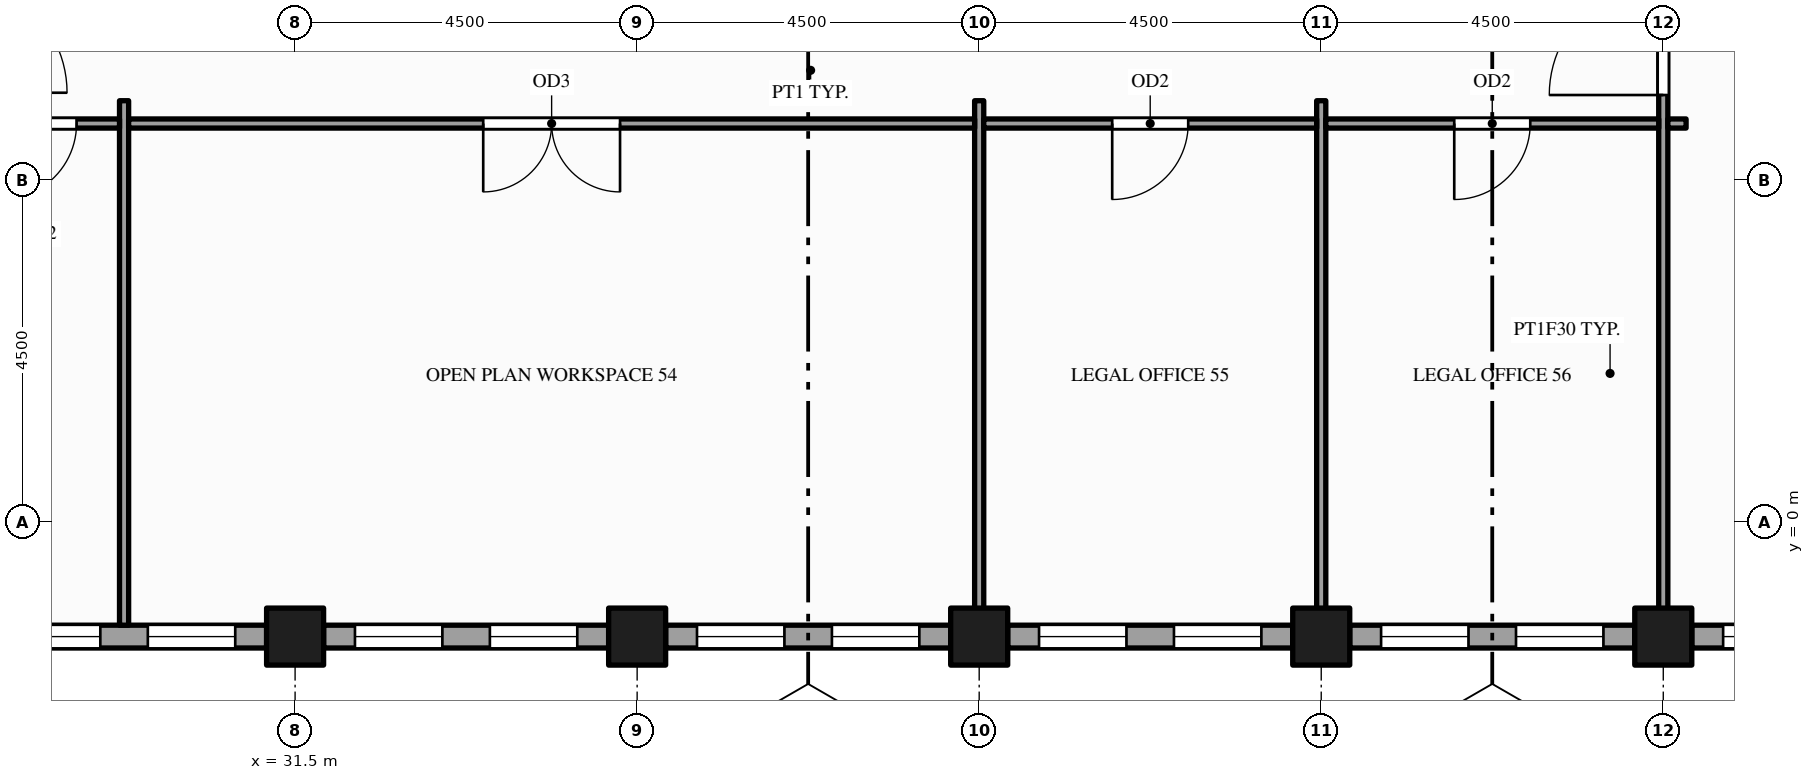
"""IFC4 building model, lengths in metres.
Left out: names, types, materials, properties, quantities, classifications, styles, units other than length and angle.
Written with IfcOpenShell. Run it as: python <this file> out.ifc"""

import sys

from ifc_helpers import new_model, si_unit, direction, frame, frame_2d, origin, origin_2d, place, context, subcontext, project, spatial, rectangle, hollow_rectangle, extrude, element, fill, save


model = new_model("IFC4")
c1 = context("Model", 3, precision=1e-05, world=origin(), true_north=direction((0.0, 1.0)))
c2 = subcontext(c1, "Body", "Model", "MODEL_VIEW")
j1 = project(units=[si_unit("LENGTHUNIT", "METRE"), si_unit("PLANEANGLEUNIT", "RADIAN")], contexts=[c1])
p1 = place(None, origin())
s1 = spatial("IfcSite", under=j1, at=p1, CompositionType="ELEMENT")
p2 = place(p1, origin())
s2 = spatial("IfcBuilding", under=s1, at=p2, CompositionType="ELEMENT")
p3 = place(p2, frame((0.0, 0.0, 239.0)))
s3 = spatial("IfcBuildingStorey", under=s2, at=p3, CompositionType="ELEMENT", Elevation=239.0)
for number, where, z_axis, x_axis in (
    (1, (31.5, -1.5, -0.15), (0.0, 0.0, 1.0), (1.0, 0.0, 0.0)),
    (2, (36.0, -1.5, -0.15), (0.0, 0.0, 1.0), (1.0, 0.0, 0.0)),
    (3, (40.5, -1.5, -0.15), (0.0, 0.0, 1.0), (1.0, 0.0, 0.0)),
    (4, (45.0, -1.5, -0.15), (0.0, 0.0, 1.0), (1.0, 0.0, 0.0)),
    (5, (49.5, -1.5, -0.15), (0.0, 0.0, 1.0), (1.0, 0.0, 0.0)),
):
    element("IfcColumn", number, at=place(p3, frame(where, z_axis=z_axis, x_axis=x_axis)), inside=s3, PredefinedType="COLUMN", context=c2, shape_type="SweptSolid", body=[
        extrude(hollow_rectangle(XDim=0.75, YDim=0.75, WallThickness=0.036, at=origin_2d()), origin(), (0.0, 0.0, 1.0), 3.85),
    ])
p4 = place(p3, frame((27.375, -1.5, 0.0), z_axis=(0.0, 0.0, 1.0), x_axis=(1.0, 0.0, 0.0)))
e6 = element("IfcWall", 6, at=p4, inside=s3, PredefinedType="STANDARD", context=c2, shape_type="SweptSolid", body=[
    extrude(rectangle(XDim=3.75, YDim=0.3, at=frame_2d((1.875, 0.0))), origin(), (0.0, 0.0, 1.0), 2.72),
])
p5 = place(p4, frame((0.413, 0.0, 0.9)))
e7 = element("IfcOpeningElement", 7, at=p5, cuts=e6, PredefinedType="OPENING", context=c2, shape_type="SweptSolid", body=[
    extrude(rectangle(XDim=1.15, YDim=1.5, at=frame_2d((0.575, 0.75))), frame((0.0, 0.16, 0.0), z_axis=(0.0, -1.0, 0.0), x_axis=(1.0, 0.0, 0.0)), (0.0, 0.0, 1.0), 0.32),
])
p6 = place(p4, frame((2.188, 0.0, 0.9)))
e8 = element("IfcOpeningElement", 8, at=p6, cuts=e6, PredefinedType="OPENING", context=c2, shape_type="SweptSolid", body=[
    extrude(rectangle(XDim=1.15, YDim=1.5, at=frame_2d((0.575, 0.75))), frame((0.0, 0.16, 0.0), z_axis=(0.0, -1.0, 0.0), x_axis=(1.0, 0.0, 0.0)), (0.0, 0.0, 1.0), 0.32),
])
p7 = place(p3, frame((31.875, -1.5, 0.0), z_axis=(0.0, 0.0, 1.0), x_axis=(1.0, 0.0, 0.0)))
e9 = element("IfcWall", 9, at=p7, inside=s3, PredefinedType="STANDARD", context=c2, shape_type="SweptSolid", body=[
    extrude(rectangle(XDim=3.75, YDim=0.3, at=frame_2d((1.875, 0.0))), origin(), (0.0, 0.0, 1.0), 2.72),
])
p8 = place(p7, frame((0.413, 0.0, 0.9)))
e10 = element("IfcOpeningElement", 10, at=p8, cuts=e9, PredefinedType="OPENING", context=c2, shape_type="SweptSolid", body=[
    extrude(rectangle(XDim=1.15, YDim=1.5, at=frame_2d((0.575, 0.75))), frame((0.0, 0.16, 0.0), z_axis=(0.0, -1.0, 0.0), x_axis=(1.0, 0.0, 0.0)), (0.0, 0.0, 1.0), 0.32),
])
p9 = place(p7, frame((2.188, 0.0, 0.9)))
e11 = element("IfcOpeningElement", 11, at=p9, cuts=e9, PredefinedType="OPENING", context=c2, shape_type="SweptSolid", body=[
    extrude(rectangle(XDim=1.15, YDim=1.5, at=frame_2d((0.575, 0.75))), frame((0.0, 0.16, 0.0), z_axis=(0.0, -1.0, 0.0), x_axis=(1.0, 0.0, 0.0)), (0.0, 0.0, 1.0), 0.32),
])
p10 = place(p3, frame((36.375, -1.5, 0.0), z_axis=(0.0, 0.0, 1.0), x_axis=(1.0, 0.0, 0.0)))
e12 = element("IfcWall", 12, at=p10, inside=s3, PredefinedType="STANDARD", context=c2, shape_type="SweptSolid", body=[
    extrude(rectangle(XDim=3.75, YDim=0.3, at=frame_2d((1.875, 0.0))), origin(), (0.0, 0.0, 1.0), 2.72),
])
p11 = place(p10, frame((0.413, 0.0, 0.9)))
e13 = element("IfcOpeningElement", 13, at=p11, cuts=e12, PredefinedType="OPENING", context=c2, shape_type="SweptSolid", body=[
    extrude(rectangle(XDim=1.15, YDim=1.5, at=frame_2d((0.575, 0.75))), frame((0.0, 0.16, 0.0), z_axis=(0.0, -1.0, 0.0), x_axis=(1.0, 0.0, 0.0)), (0.0, 0.0, 1.0), 0.32),
])
p12 = place(p10, frame((2.188, 0.0, 0.9)))
e14 = element("IfcOpeningElement", 14, at=p12, cuts=e12, PredefinedType="OPENING", context=c2, shape_type="SweptSolid", body=[
    extrude(rectangle(XDim=1.15, YDim=1.5, at=frame_2d((0.575, 0.75))), frame((0.0, 0.16, 0.0), z_axis=(0.0, -1.0, 0.0), x_axis=(1.0, 0.0, 0.0)), (0.0, 0.0, 1.0), 0.32),
])
p13 = place(p3, frame((40.875, -1.5, 0.0), z_axis=(0.0, 0.0, 1.0), x_axis=(1.0, 0.0, 0.0)))
e15 = element("IfcWall", 15, at=p13, inside=s3, PredefinedType="STANDARD", context=c2, shape_type="SweptSolid", body=[
    extrude(rectangle(XDim=3.75, YDim=0.3, at=frame_2d((1.875, 0.0))), origin(), (0.0, 0.0, 1.0), 2.72),
])
p14 = place(p13, frame((0.413, 0.0, 0.9)))
e16 = element("IfcOpeningElement", 16, at=p14, cuts=e15, PredefinedType="OPENING", context=c2, shape_type="SweptSolid", body=[
    extrude(rectangle(XDim=1.15, YDim=1.5, at=frame_2d((0.575, 0.75))), frame((0.0, 0.16, 0.0), z_axis=(0.0, -1.0, 0.0), x_axis=(1.0, 0.0, 0.0)), (0.0, 0.0, 1.0), 0.32),
])
p15 = place(p13, frame((2.188, 0.0, 0.9)))
e17 = element("IfcOpeningElement", 17, at=p15, cuts=e15, PredefinedType="OPENING", context=c2, shape_type="SweptSolid", body=[
    extrude(rectangle(XDim=1.15, YDim=1.5, at=frame_2d((0.575, 0.75))), frame((0.0, 0.16, 0.0), z_axis=(0.0, -1.0, 0.0), x_axis=(1.0, 0.0, 0.0)), (0.0, 0.0, 1.0), 0.32),
])
p16 = place(p3, frame((45.375, -1.5, 0.0), z_axis=(0.0, 0.0, 1.0), x_axis=(1.0, 0.0, 0.0)))
e18 = element("IfcWall", 18, at=p16, inside=s3, PredefinedType="STANDARD", context=c2, shape_type="SweptSolid", body=[
    extrude(rectangle(XDim=3.75, YDim=0.3, at=frame_2d((1.875, 0.0))), origin(), (0.0, 0.0, 1.0), 2.72),
])
p17 = place(p16, frame((0.413, 0.0, 0.9)))
e19 = element("IfcOpeningElement", 19, at=p17, cuts=e18, PredefinedType="OPENING", context=c2, shape_type="SweptSolid", body=[
    extrude(rectangle(XDim=1.15, YDim=1.5, at=frame_2d((0.575, 0.75))), frame((0.0, 0.16, 0.0), z_axis=(0.0, -1.0, 0.0), x_axis=(1.0, 0.0, 0.0)), (0.0, 0.0, 1.0), 0.32),
])
p18 = place(p16, frame((2.188, 0.0, 0.9)))
e20 = element("IfcOpeningElement", 20, at=p18, cuts=e18, PredefinedType="OPENING", context=c2, shape_type="SweptSolid", body=[
    extrude(rectangle(XDim=1.15, YDim=1.5, at=frame_2d((0.575, 0.75))), frame((0.0, 0.16, 0.0), z_axis=(0.0, -1.0, 0.0), x_axis=(1.0, 0.0, 0.0)), (0.0, 0.0, 1.0), 0.32),
])
p19 = place(p3, frame((49.875, -1.5, 0.0), z_axis=(0.0, 0.0, 1.0), x_axis=(1.0, 0.0, 0.0)))
e21 = element("IfcWall", 21, at=p19, inside=s3, PredefinedType="STANDARD", context=c2, shape_type="SweptSolid", body=[
    extrude(rectangle(XDim=3.75, YDim=0.3, at=frame_2d((1.875, 0.0))), origin(), (0.0, 0.0, 1.0), 2.72),
])
p20 = place(p19, frame((0.413, 0.0, 0.9)))
e22 = element("IfcOpeningElement", 22, at=p20, cuts=e21, PredefinedType="OPENING", context=c2, shape_type="SweptSolid", body=[
    extrude(rectangle(XDim=1.15, YDim=1.5, at=frame_2d((0.575, 0.75))), frame((0.0, 0.16, 0.0), z_axis=(0.0, -1.0, 0.0), x_axis=(1.0, 0.0, 0.0)), (0.0, 0.0, 1.0), 0.32),
])
p21 = place(p19, frame((2.188, 0.0, 0.9)))
e23 = element("IfcOpeningElement", 23, at=p21, cuts=e21, PredefinedType="OPENING", context=c2, shape_type="SweptSolid", body=[
    extrude(rectangle(XDim=1.15, YDim=1.5, at=frame_2d((0.575, 0.75))), frame((0.0, 0.16, 0.0), z_axis=(0.0, -1.0, 0.0), x_axis=(1.0, 0.0, 0.0)), (0.0, 0.0, 1.0), 0.32),
])
p22 = place(p3, frame((29.25, -1.35, 0.0), z_axis=(0.0, 0.0, 1.0), x_axis=(0.0, 1.0, 0.0)))
e24 = element("IfcWall", 24, at=p22, inside=s3, PredefinedType="PARTITIONING", context=c2, shape_type="SweptSolid", body=[
    extrude(rectangle(XDim=6.9, YDim=0.12, at=frame_2d((3.45, 0.0))), origin(), (0.0, 0.0, 1.0), 2.72),
])
for number, where, z_axis, x_axis in (
    (25, (40.5, -1.35, 0.0), (0.0, 0.0, 1.0), (0.0, 1.0, 0.0)),
    (26, (45.0, -1.35, 0.0), (0.0, 0.0, 1.0), (0.0, 1.0, 0.0)),
):
    element("IfcWall", number, at=place(p3, frame(where, z_axis=z_axis, x_axis=x_axis)), inside=s3, PredefinedType="PARTITIONING", context=c2, shape_type="SweptSolid", body=[
        extrude(rectangle(XDim=6.9, YDim=0.12, at=frame_2d((3.45, 0.0))), origin(), (0.0, 0.0, 1.0), 2.3),
    ])
p23 = place(p3, frame((49.5, -1.35, 0.0), z_axis=(0.0, 0.0, 1.0), x_axis=(0.0, 1.0, 0.0)))
e27 = element("IfcWall", 27, at=p23, inside=s3, PredefinedType="PARTITIONING", context=c2, shape_type="SweptSolid", body=[
    extrude(rectangle(XDim=22.2, YDim=0.12, at=frame_2d((11.1, 0.0))), origin(), (0.0, 0.0, 1.0), 2.3),
])
p24 = place(p23, frame((6.975, 0.0, 0.0)))
e28 = element("IfcOpeningElement", 28, at=p24, cuts=e27, PredefinedType="OPENING", context=c2, shape_type="SweptSolid", body=[
    extrude(rectangle(XDim=1.5, YDim=2.1, at=frame_2d((0.75, 1.05))), frame((0.0, 0.07, 0.0), z_axis=(0.0, -1.0, 0.0), x_axis=(1.0, 0.0, 0.0)), (0.0, 0.0, 1.0), 0.14),
])
p25 = place(p23, frame((13.725, 0.0, 0.0)))
e29 = element("IfcOpeningElement", 29, at=p25, cuts=e27, PredefinedType="OPENING", context=c2, shape_type="SweptSolid", body=[
    extrude(rectangle(XDim=1.5, YDim=2.1, at=frame_2d((0.75, 1.05))), frame((0.0, 0.07, 0.0), z_axis=(0.0, -1.0, 0.0), x_axis=(1.0, 0.0, 0.0)), (0.0, 0.0, 1.0), 0.14),
])
p26 = place(p23, frame((9.29, 0.0, 0.0)))
e30 = element("IfcOpeningElement", 30, at=p26, cuts=e27, PredefinedType="OPENING", context=c2, shape_type="SweptSolid", body=[
    extrude(rectangle(XDim=0.9, YDim=2.1, at=frame_2d((0.45, 1.05))), frame((0.0, 0.07, 0.0), z_axis=(0.0, -1.0, 0.0), x_axis=(1.0, 0.0, 0.0)), (0.0, 0.0, 1.0), 0.14),
])
p27 = place(p23, frame((10.65, 0.0, 0.0)))
e31 = element("IfcOpeningElement", 31, at=p27, cuts=e27, PredefinedType="OPENING", context=c2, shape_type="SweptSolid", body=[
    extrude(rectangle(XDim=0.9, YDim=2.1, at=frame_2d((0.45, 1.05))), frame((0.0, 0.07, 0.0), z_axis=(0.0, -1.0, 0.0), x_axis=(1.0, 0.0, 0.0)), (0.0, 0.0, 1.0), 0.14),
])
p28 = place(p23, frame((12.01, 0.0, 0.0)))
e32 = element("IfcOpeningElement", 32, at=p28, cuts=e27, PredefinedType="OPENING", context=c2, shape_type="SweptSolid", body=[
    extrude(rectangle(XDim=1.0, YDim=2.1, at=frame_2d((0.5, 1.05))), frame((0.0, 0.07, 0.0), z_axis=(0.0, -1.0, 0.0), x_axis=(1.0, 0.0, 0.0)), (0.0, 0.0, 1.0), 0.14),
])
p29 = place(p3, frame((27.06, 5.25, 0.0), z_axis=(0.0, 0.0, 1.0), x_axis=(1.0, 0.0, 0.0)))
e33 = element("IfcWall", 33, at=p29, inside=s3, PredefinedType="PARTITIONING", context=c2, shape_type="SweptSolid", body=[
    extrude(rectangle(XDim=2.13, YDim=0.12, at=frame_2d((1.065, 0.0))), origin(), (0.0, 0.0, 1.0), 2.77),
])
p30 = place(p29, frame((0.565, 0.0, 0.0)))
e34 = element("IfcOpeningElement", 34, at=p30, cuts=e33, PredefinedType="OPENING", context=c2, shape_type="SweptSolid", body=[
    extrude(rectangle(XDim=1.0, YDim=2.1, at=frame_2d((0.5, 1.05))), frame((0.0, 0.07, 0.0), z_axis=(0.0, -1.0, 0.0), x_axis=(1.0, 0.0, 0.0)), (0.0, 0.0, 1.0), 0.14),
])
p31 = place(p3, frame((29.31, 5.25, 0.0), z_axis=(0.0, 0.0, 1.0), x_axis=(1.0, 0.0, 0.0)))
e35 = element("IfcWall", 35, at=p31, inside=s3, PredefinedType="PARTITIONING", context=c2, shape_type="SweptSolid", body=[
    extrude(rectangle(XDim=11.13, YDim=0.12, at=frame_2d((5.565, 0.0))), origin(), (0.0, 0.0, 1.0), 2.77),
])
p32 = place(p31, frame((4.665, 0.0, 0.0)))
e36 = element("IfcOpeningElement", 36, at=p32, cuts=e35, PredefinedType="OPENING", context=c2, shape_type="SweptSolid", body=[
    extrude(rectangle(XDim=1.8, YDim=2.1, at=frame_2d((0.9, 1.05))), frame((0.0, 0.07, 0.0), z_axis=(0.0, -1.0, 0.0), x_axis=(1.0, 0.0, 0.0)), (0.0, 0.0, 1.0), 0.14),
])
p33 = place(p3, frame((40.56, 5.25, 0.0), z_axis=(0.0, 0.0, 1.0), x_axis=(1.0, 0.0, 0.0)))
e37 = element("IfcWall", 37, at=p33, inside=s3, PredefinedType="PARTITIONING", context=c2, shape_type="SweptSolid", body=[
    extrude(rectangle(XDim=4.38, YDim=0.12, at=frame_2d((2.19, 0.0))), origin(), (0.0, 0.0, 1.0), 2.77),
])
p34 = place(p33, frame((1.69, 0.0, 0.0)))
e38 = element("IfcOpeningElement", 38, at=p34, cuts=e37, PredefinedType="OPENING", context=c2, shape_type="SweptSolid", body=[
    extrude(rectangle(XDim=1.0, YDim=2.1, at=frame_2d((0.5, 1.05))), frame((0.0, 0.07, 0.0), z_axis=(0.0, -1.0, 0.0), x_axis=(1.0, 0.0, 0.0)), (0.0, 0.0, 1.0), 0.14),
])
p35 = place(p3, frame((45.06, 5.25, 0.0), z_axis=(0.0, 0.0, 1.0), x_axis=(1.0, 0.0, 0.0)))
e39 = element("IfcWall", 39, at=p35, inside=s3, PredefinedType="PARTITIONING", context=c2, shape_type="SweptSolid", body=[
    extrude(rectangle(XDim=4.38, YDim=0.12, at=frame_2d((2.19, 0.0))), origin(), (0.0, 0.0, 1.0), 2.77),
])
p36 = place(p35, frame((1.69, 0.0, 0.0)))
e40 = element("IfcOpeningElement", 40, at=p36, cuts=e39, PredefinedType="OPENING", context=c2, shape_type="SweptSolid", body=[
    extrude(rectangle(XDim=1.0, YDim=2.1, at=frame_2d((0.5, 1.05))), frame((0.0, 0.07, 0.0), z_axis=(0.0, -1.0, 0.0), x_axis=(1.0, 0.0, 0.0)), (0.0, 0.0, 1.0), 0.14),
])
p37 = place(p3, frame((49.56, 5.25, 0.0), z_axis=(0.0, 0.0, 1.0), x_axis=(1.0, 0.0, 0.0)))
e41 = element("IfcWall", 41, at=p37, inside=s3, PredefinedType="PARTITIONING", context=c2, shape_type="SweptSolid", body=[
    extrude(rectangle(XDim=0.24, YDim=0.12, at=frame_2d((0.12, 0.0))), origin(), (0.0, 0.0, 1.0), 2.77),
])
p38 = place(p5, origin())
e42 = element("IfcWindow", 42, at=p38, inside=s3, PartitioningType="SINGLE_PANEL", PredefinedType="WINDOW", context=c2, shape_type="SweptSolid", body=[
    extrude(rectangle(XDim=1.15, YDim=1.5, at=frame_2d((0.575, 0.75))), frame((0.0, 0.03, 0.0), z_axis=(0.0, -1.0, 0.0), x_axis=(1.0, 0.0, 0.0)), (0.0, 0.0, 1.0), 0.06),
])
fill(e7, e42)
p39 = place(p6, origin())
e43 = element("IfcWindow", 43, at=p39, inside=s3, PartitioningType="SINGLE_PANEL", PredefinedType="WINDOW", context=c2, shape_type="SweptSolid", body=[
    extrude(rectangle(XDim=1.15, YDim=1.5, at=frame_2d((0.575, 0.75))), frame((0.0, 0.03, 0.0), z_axis=(0.0, -1.0, 0.0), x_axis=(1.0, 0.0, 0.0)), (0.0, 0.0, 1.0), 0.06),
])
fill(e8, e43)
p40 = place(p8, origin())
e44 = element("IfcWindow", 44, at=p40, inside=s3, PartitioningType="SINGLE_PANEL", PredefinedType="WINDOW", context=c2, shape_type="SweptSolid", body=[
    extrude(rectangle(XDim=1.15, YDim=1.5, at=frame_2d((0.575, 0.75))), frame((0.0, 0.03, 0.0), z_axis=(0.0, -1.0, 0.0), x_axis=(1.0, 0.0, 0.0)), (0.0, 0.0, 1.0), 0.06),
])
fill(e10, e44)
p41 = place(p9, origin())
e45 = element("IfcWindow", 45, at=p41, inside=s3, PartitioningType="SINGLE_PANEL", PredefinedType="WINDOW", context=c2, shape_type="SweptSolid", body=[
    extrude(rectangle(XDim=1.15, YDim=1.5, at=frame_2d((0.575, 0.75))), frame((0.0, 0.03, 0.0), z_axis=(0.0, -1.0, 0.0), x_axis=(1.0, 0.0, 0.0)), (0.0, 0.0, 1.0), 0.06),
])
fill(e11, e45)
p42 = place(p11, origin())
e46 = element("IfcWindow", 46, at=p42, inside=s3, PartitioningType="SINGLE_PANEL", PredefinedType="WINDOW", context=c2, shape_type="SweptSolid", body=[
    extrude(rectangle(XDim=1.15, YDim=1.5, at=frame_2d((0.575, 0.75))), frame((0.0, 0.03, 0.0), z_axis=(0.0, -1.0, 0.0), x_axis=(1.0, 0.0, 0.0)), (0.0, 0.0, 1.0), 0.06),
])
fill(e13, e46)
p43 = place(p12, origin())
e47 = element("IfcWindow", 47, at=p43, inside=s3, PartitioningType="SINGLE_PANEL", PredefinedType="WINDOW", context=c2, shape_type="SweptSolid", body=[
    extrude(rectangle(XDim=1.15, YDim=1.5, at=frame_2d((0.575, 0.75))), frame((0.0, 0.03, 0.0), z_axis=(0.0, -1.0, 0.0), x_axis=(1.0, 0.0, 0.0)), (0.0, 0.0, 1.0), 0.06),
])
fill(e14, e47)
p44 = place(p14, origin())
e48 = element("IfcWindow", 48, at=p44, inside=s3, PartitioningType="SINGLE_PANEL", PredefinedType="WINDOW", context=c2, shape_type="SweptSolid", body=[
    extrude(rectangle(XDim=1.15, YDim=1.5, at=frame_2d((0.575, 0.75))), frame((0.0, 0.03, 0.0), z_axis=(0.0, -1.0, 0.0), x_axis=(1.0, 0.0, 0.0)), (0.0, 0.0, 1.0), 0.06),
])
fill(e16, e48)
p45 = place(p15, origin())
e49 = element("IfcWindow", 49, at=p45, inside=s3, PartitioningType="SINGLE_PANEL", PredefinedType="WINDOW", context=c2, shape_type="SweptSolid", body=[
    extrude(rectangle(XDim=1.15, YDim=1.5, at=frame_2d((0.575, 0.75))), frame((0.0, 0.03, 0.0), z_axis=(0.0, -1.0, 0.0), x_axis=(1.0, 0.0, 0.0)), (0.0, 0.0, 1.0), 0.06),
])
fill(e17, e49)
p46 = place(p17, origin())
e50 = element("IfcWindow", 50, at=p46, inside=s3, PartitioningType="SINGLE_PANEL", PredefinedType="WINDOW", context=c2, shape_type="SweptSolid", body=[
    extrude(rectangle(XDim=1.15, YDim=1.5, at=frame_2d((0.575, 0.75))), frame((0.0, 0.03, 0.0), z_axis=(0.0, -1.0, 0.0), x_axis=(1.0, 0.0, 0.0)), (0.0, 0.0, 1.0), 0.06),
])
fill(e19, e50)
p47 = place(p18, origin())
e51 = element("IfcWindow", 51, at=p47, inside=s3, PartitioningType="SINGLE_PANEL", PredefinedType="WINDOW", context=c2, shape_type="SweptSolid", body=[
    extrude(rectangle(XDim=1.15, YDim=1.5, at=frame_2d((0.575, 0.75))), frame((0.0, 0.03, 0.0), z_axis=(0.0, -1.0, 0.0), x_axis=(1.0, 0.0, 0.0)), (0.0, 0.0, 1.0), 0.06),
])
fill(e20, e51)
p48 = place(p20, origin())
e52 = element("IfcWindow", 52, at=p48, inside=s3, PartitioningType="SINGLE_PANEL", PredefinedType="WINDOW", context=c2, shape_type="SweptSolid", body=[
    extrude(rectangle(XDim=1.15, YDim=1.5, at=frame_2d((0.575, 0.75))), frame((0.0, 0.03, 0.0), z_axis=(0.0, -1.0, 0.0), x_axis=(1.0, 0.0, 0.0)), (0.0, 0.0, 1.0), 0.06),
])
fill(e22, e52)
p49 = place(p24, origin())
e53 = element("IfcDoor", 53, at=p49, inside=s3, OperationType="SINGLE_SWING_LEFT", PredefinedType="DOOR", context=c2, shape_type="SweptSolid", body=[
    extrude(rectangle(XDim=1.5, YDim=2.1, at=frame_2d((0.75, 1.05))), frame((0.0, 0.025, 0.0), z_axis=(0.0, -1.0, 0.0), x_axis=(1.0, 0.0, 0.0)), (0.0, 0.0, 1.0), 0.05),
])
fill(e28, e53)
p50 = place(p30, origin())
e54 = element("IfcDoor", 54, at=p50, inside=s3, OperationType="SINGLE_SWING_LEFT", PredefinedType="DOOR", context=c2, shape_type="SweptSolid", body=[
    extrude(rectangle(XDim=1.0, YDim=2.1, at=frame_2d((0.5, 1.05))), frame((0.0, 0.025, 0.0), z_axis=(0.0, -1.0, 0.0), x_axis=(1.0, 0.0, 0.0)), (0.0, 0.0, 1.0), 0.05),
])
fill(e34, e54)
p51 = place(p32, origin())
e55 = element("IfcDoor", 55, at=p51, inside=s3, OperationType="DOUBLE_DOOR_SINGLE_SWING", PredefinedType="DOOR", context=c2, shape_type="SweptSolid", body=[
    extrude(rectangle(XDim=1.8, YDim=2.1, at=frame_2d((0.9, 1.05))), frame((0.0, 0.025, 0.0), z_axis=(0.0, -1.0, 0.0), x_axis=(1.0, 0.0, 0.0)), (0.0, 0.0, 1.0), 0.05),
])
fill(e36, e55)
p52 = place(p34, origin())
e56 = element("IfcDoor", 56, at=p52, inside=s3, OperationType="SINGLE_SWING_LEFT", PredefinedType="DOOR", context=c2, shape_type="SweptSolid", body=[
    extrude(rectangle(XDim=1.0, YDim=2.1, at=frame_2d((0.5, 1.05))), frame((0.0, 0.025, 0.0), z_axis=(0.0, -1.0, 0.0), x_axis=(1.0, 0.0, 0.0)), (0.0, 0.0, 1.0), 0.05),
])
fill(e38, e56)
p53 = place(p36, origin())
e57 = element("IfcDoor", 57, at=p53, inside=s3, OperationType="SINGLE_SWING_LEFT", PredefinedType="DOOR", context=c2, shape_type="SweptSolid", body=[
    extrude(rectangle(XDim=1.0, YDim=2.1, at=frame_2d((0.5, 1.05))), frame((0.0, 0.025, 0.0), z_axis=(0.0, -1.0, 0.0), x_axis=(1.0, 0.0, 0.0)), (0.0, 0.0, 1.0), 0.05),
])
fill(e40, e57)
save(model, sys.argv[1])
